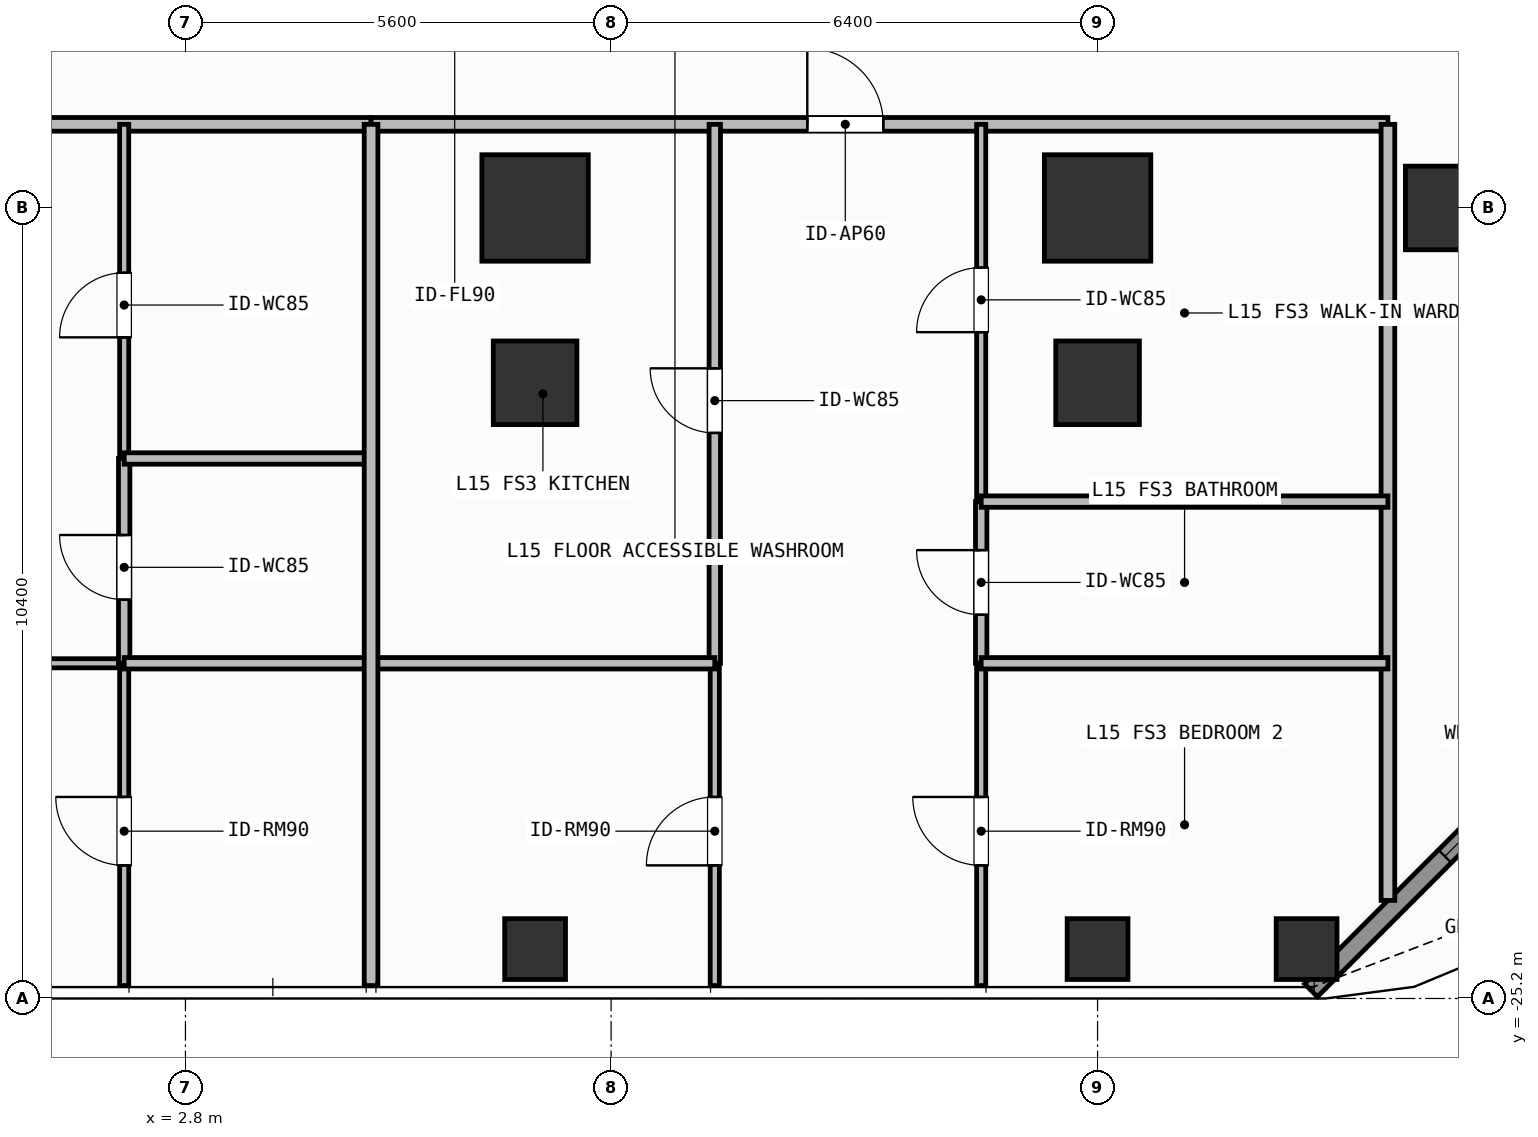
"""IFC4 building model, lengths in metres.
Left out: names, types, materials, properties, quantities, classifications, styles, units other than length and angle.
Written with IfcOpenShell. Run it as: python <this file> out.ifc"""

import sys

from ifc_helpers import new_model, si_unit, direction, frame, frame_2d, origin, origin_2d, place, context, subcontext, project, spatial, rectangle, hollow_rectangle, extrude, element, fill, save


model = new_model("IFC4")
c1 = context("Model", 3, precision=1e-05, world=origin(), true_north=direction((0.0, 1.0)))
c2 = subcontext(c1, "Body", "Model", "MODEL_VIEW")
j1 = project(units=[si_unit("LENGTHUNIT", "METRE"), si_unit("PLANEANGLEUNIT", "RADIAN")], contexts=[c1])
p1 = place(None, origin())
s1 = spatial("IfcSite", under=j1, at=p1, CompositionType="ELEMENT")
p2 = place(p1, origin())
s2 = spatial("IfcBuilding", under=s1, at=p2, CompositionType="ELEMENT")
p3 = place(p2, frame((0.0, 0.0, 57.9)))
s3 = spatial("IfcBuildingStorey", under=s2, at=p3, CompositionType="ELEMENT", Elevation=57.9)
for number, where, z_axis, x_axis in (
    (1, (7.4, -14.8, 0.0), (0.0, 0.0, 1.0), (1.0, 0.0, 0.0)),
    (2, (14.8, -14.8, 0.0), (0.0, 0.0, 1.0), (1.0, 0.0, 0.0)),
):
    element("IfcColumn", number, at=place(p3, frame(where, z_axis=z_axis, x_axis=x_axis)), inside=s3, PredefinedType="COLUMN", context=c2, shape_type="SweptSolid", body=[
        extrude(rectangle(XDim=1.4, YDim=1.4, at=origin_2d()), origin(), (0.0, 0.0, 1.0), 3.9),
    ])
for number, where, z_axis, x_axis in (
    (3, (19.4, -14.8, 0.0), (0.0, 0.0, 1.0), (1.0, 0.0, 0.0)),
    (4, (7.4, -17.1, 0.0), (0.0, 0.0, 1.0), (1.0, 0.0, 0.0)),
    (5, (14.8, -17.1, 0.0), (0.0, 0.0, 1.0), (1.0, 0.0, 0.0)),
):
    element("IfcColumn", number, at=place(p3, frame(where, z_axis=z_axis, x_axis=x_axis)), inside=s3, PredefinedType="COLUMN", context=c2, shape_type="SweptSolid", body=[
        extrude(rectangle(XDim=1.1, YDim=1.1, at=origin_2d()), origin(), (0.0, 0.0, 1.0), 3.9),
    ])
for number, where, z_axis, x_axis in (
    (6, (17.55, -24.55, 0.0), (0.0, 0.0, 1.0), (1.0, 0.0, 0.0)),
    (7, (7.4, -24.55, 0.0), (0.0, 0.0, 1.0), (1.0, 0.0, 0.0)),
    (8, (14.8, -24.55, 0.0), (0.0, 0.0, 1.0), (1.0, 0.0, 0.0)),
):
    element("IfcColumn", number, at=place(p3, frame(where, z_axis=z_axis, x_axis=x_axis)), inside=s3, PredefinedType="COLUMN", context=c2, shape_type="SweptSolid", body=[
        extrude(hollow_rectangle(XDim=0.8, YDim=0.8, WallThickness=0.036, at=origin_2d()), origin(), (0.0, 0.0, 1.0), 3.9),
    ])
p4 = place(p3, frame((22.192, -20.508, 0.0), z_axis=(0.0, 0.0, 1.0), x_axis=(-0.707106781187, -0.707106781187, 0.0)))
e9 = element("IfcWall", 9, at=p4, inside=s3, PredefinedType="SOLIDWALL", context=c2, shape_type="SweptSolid", body=[
    extrude(rectangle(XDim=6.484, YDim=0.24, at=frame_2d((3.242, 0.0))), origin(), (0.0, 0.0, 1.0), 3.68),
])
p5 = place(p4, frame((2.492, 0.0, 0.8)))
e10 = element("IfcOpeningElement", 10, at=p5, cuts=e9, PredefinedType="OPENING", context=c2, shape_type="SweptSolid", body=[
    extrude(rectangle(XDim=1.5, YDim=1.85, at=frame_2d((0.75, 0.925))), frame((0.0, 0.13, 0.0), z_axis=(0.0, -1.0, 0.0), x_axis=(1.0, 0.0, 0.0)), (0.0, 0.0, 1.0), 0.26),
])
p6 = place(p3, frame((-12.225, -13.7, 0.0), z_axis=(0.0, 0.0, 1.0), x_axis=(1.0, 0.0, 0.0)))
e11 = element("IfcWall", 11, at=p6, inside=s3, PredefinedType="PARTITIONING", context=c2, shape_type="SweptSolid", body=[
    extrude(rectangle(XDim=17.467, YDim=0.18, at=frame_2d((8.733, 0.0))), origin(), (0.0, 0.0, 1.0), 3.68),
])
p7 = place(p6, frame((9.848, 0.0, 0.0)))
e12 = element("IfcOpeningElement", 12, at=p7, cuts=e11, PredefinedType="OPENING", context=c2, shape_type="SweptSolid", body=[
    extrude(rectangle(XDim=1.0, YDim=2.2, at=frame_2d((0.5, 1.1))), frame((0.0, 0.1, 0.0), z_axis=(0.0, -1.0, 0.0), x_axis=(1.0, 0.0, 0.0)), (0.0, 0.0, 1.0), 0.2),
])
p8 = place(p3, frame((-5.477, -20.79, 0.0), z_axis=(0.0, 0.0, 1.0), x_axis=(1.0, 0.0, 0.0)))
e13 = element("IfcWall", 13, at=p8, inside=s3, PredefinedType="PARTITIONING", context=c2, shape_type="SweptSolid", body=[
    extrude(rectangle(XDim=7.471, YDim=0.12, at=frame_2d((3.735, 0.0))), origin(), (0.0, 0.0, 1.0), 3.68),
])
p9 = place(p8, frame((3.375, 0.0, 0.0)))
e14 = element("IfcOpeningElement", 14, at=p9, cuts=e13, PredefinedType="OPENING", context=c2, shape_type="SweptSolid", body=[
    extrude(rectangle(XDim=0.9, YDim=2.1, at=frame_2d((0.45, 1.05))), frame((0.0, 0.07, 0.0), z_axis=(0.0, -1.0, 0.0), x_axis=(1.0, 0.0, 0.0)), (0.0, 0.0, 1.0), 0.14),
])
p10 = place(p3, frame((1.994, -20.79, 0.0), z_axis=(0.0, 0.0, 1.0), x_axis=(0.0, 1.0, 0.0)))
e15 = element("IfcWall", 15, at=p10, inside=s3, PredefinedType="PARTITIONING", context=c2, shape_type="SweptSolid", body=[
    extrude(rectangle(XDim=2.694, YDim=0.15, at=frame_2d((1.347, 0.0))), origin(), (0.0, 0.0, 1.0), 3.68),
])
p11 = place(p10, frame((0.837, 0.0, 0.0)))
e16 = element("IfcOpeningElement", 16, at=p11, cuts=e15, PredefinedType="OPENING", context=c2, shape_type="SweptSolid", body=[
    extrude(rectangle(XDim=0.85, YDim=2.1, at=frame_2d((0.425, 1.05))), frame((0.0, 0.085, 0.0), z_axis=(0.0, -1.0, 0.0), x_axis=(1.0, 0.0, 0.0)), (0.0, 0.0, 1.0), 0.17),
])
p12 = place(p3, frame((1.994, -18.096, 0.0), z_axis=(0.0, 0.0, 1.0), x_axis=(0.0, 1.0, 0.0)))
e17 = element("IfcWall", 17, at=p12, inside=s3, PredefinedType="PARTITIONING", context=c2, shape_type="SweptSolid", body=[
    extrude(rectangle(XDim=4.396, YDim=0.12, at=frame_2d((2.198, 0.0))), origin(), (0.0, 0.0, 1.0), 3.68),
])
p13 = place(p12, frame((1.594, 0.0, 0.0)))
e18 = element("IfcOpeningElement", 18, at=p13, cuts=e17, PredefinedType="OPENING", context=c2, shape_type="SweptSolid", body=[
    extrude(rectangle(XDim=0.85, YDim=2.1, at=frame_2d((0.425, 1.05))), frame((0.0, 0.07, 0.0), z_axis=(0.0, -1.0, 0.0), x_axis=(1.0, 0.0, 0.0)), (0.0, 0.0, 1.0), 0.14),
])
p14 = place(p3, frame((1.994, -25.03, 0.0), z_axis=(0.0, 0.0, 1.0), x_axis=(0.0, 1.0, 0.0)))
e19 = element("IfcWall", 19, at=p14, inside=s3, PredefinedType="PARTITIONING", context=c2, shape_type="SweptSolid", body=[
    extrude(rectangle(XDim=4.24, YDim=0.12, at=frame_2d((2.12, 0.0))), origin(), (0.0, 0.0, 1.0), 3.68),
])
p15 = place(p14, frame((1.581, 0.0, 0.0)))
e20 = element("IfcOpeningElement", 20, at=p15, cuts=e19, PredefinedType="OPENING", context=c2, shape_type="SweptSolid", body=[
    extrude(rectangle(XDim=0.9, YDim=2.1, at=frame_2d((0.45, 1.05))), frame((0.0, 0.07, 0.0), z_axis=(0.0, -1.0, 0.0), x_axis=(1.0, 0.0, 0.0)), (0.0, 0.0, 1.0), 0.14),
])
p16 = place(p3, frame((5.242, -13.7, 0.0), z_axis=(0.0, 0.0, 1.0), x_axis=(1.0, 0.0, 0.0)))
e21 = element("IfcWall", 21, at=p16, inside=s3, PredefinedType="PARTITIONING", context=c2, shape_type="SweptSolid", body=[
    extrude(rectangle(XDim=13.378, YDim=0.18, at=frame_2d((6.689, 0.0))), origin(), (0.0, 0.0, 1.0), 3.68),
])
p17 = place(p16, frame((5.739, 0.0, 0.0)))
e22 = element("IfcOpeningElement", 22, at=p17, cuts=e21, PredefinedType="OPENING", context=c2, shape_type="SweptSolid", body=[
    extrude(rectangle(XDim=1.0, YDim=2.2, at=frame_2d((0.5, 1.1))), frame((0.0, 0.1, 0.0), z_axis=(0.0, -1.0, 0.0), x_axis=(1.0, 0.0, 0.0)), (0.0, 0.0, 1.0), 0.2),
])
p18 = place(p3, frame((9.764, -20.79, 0.0), z_axis=(0.0, 0.0, 1.0), x_axis=(0.0, 1.0, 0.0)))
e23 = element("IfcWall", 23, at=p18, inside=s3, PredefinedType="PARTITIONING", context=c2, shape_type="SweptSolid", body=[
    extrude(rectangle(XDim=7.09, YDim=0.15, at=frame_2d((3.545, 0.0))), origin(), (0.0, 0.0, 1.0), 3.68),
])
p19 = place(p18, frame((3.03, 0.0, 0.0)))
e24 = element("IfcOpeningElement", 24, at=p19, cuts=e23, PredefinedType="OPENING", context=c2, shape_type="SweptSolid", body=[
    extrude(rectangle(XDim=0.85, YDim=2.1, at=frame_2d((0.425, 1.05))), frame((0.0, 0.085, 0.0), z_axis=(0.0, -1.0, 0.0), x_axis=(1.0, 0.0, 0.0)), (0.0, 0.0, 1.0), 0.17),
])
p20 = place(p3, frame((9.764, -25.03, 0.0), z_axis=(0.0, 0.0, 1.0), x_axis=(0.0, 1.0, 0.0)))
e25 = element("IfcWall", 25, at=p20, inside=s3, PredefinedType="PARTITIONING", context=c2, shape_type="SweptSolid", body=[
    extrude(rectangle(XDim=4.24, YDim=0.12, at=frame_2d((2.12, 0.0))), origin(), (0.0, 0.0, 1.0), 3.68),
])
p21 = place(p20, frame((1.581, 0.0, 0.0)))
e26 = element("IfcOpeningElement", 26, at=p21, cuts=e25, PredefinedType="OPENING", context=c2, shape_type="SweptSolid", body=[
    extrude(rectangle(XDim=0.9, YDim=2.1, at=frame_2d((0.45, 1.05))), frame((0.0, 0.07, 0.0), z_axis=(0.0, -1.0, 0.0), x_axis=(1.0, 0.0, 0.0)), (0.0, 0.0, 1.0), 0.14),
])
p22 = place(p3, frame((13.269, -20.79, 0.0), z_axis=(0.0, 0.0, 1.0), x_axis=(0.0, 1.0, 0.0)))
e27 = element("IfcWall", 27, at=p22, inside=s3, PredefinedType="PARTITIONING", context=c2, shape_type="SweptSolid", body=[
    extrude(rectangle(XDim=2.127, YDim=0.15, at=frame_2d((1.063, 0.0))), origin(), (0.0, 0.0, 1.0), 3.68),
])
p23 = place(p22, frame((0.638, 0.0, 0.0)))
e28 = element("IfcOpeningElement", 28, at=p23, cuts=e27, PredefinedType="OPENING", context=c2, shape_type="SweptSolid", body=[
    extrude(rectangle(XDim=0.85, YDim=2.1, at=frame_2d((0.425, 1.05))), frame((0.0, 0.085, 0.0), z_axis=(0.0, -1.0, 0.0), x_axis=(1.0, 0.0, 0.0)), (0.0, 0.0, 1.0), 0.17),
])
p24 = place(p3, frame((13.269, -18.663, 0.0), z_axis=(0.0, 0.0, 1.0), x_axis=(0.0, 1.0, 0.0)))
e29 = element("IfcWall", 29, at=p24, inside=s3, PredefinedType="PARTITIONING", context=c2, shape_type="SweptSolid", body=[
    extrude(rectangle(XDim=4.963, YDim=0.12, at=frame_2d((2.481, 0.0))), origin(), (0.0, 0.0, 1.0), 3.68),
])
p25 = place(p24, frame((2.229, 0.0, 0.0)))
e30 = element("IfcOpeningElement", 30, at=p25, cuts=e29, PredefinedType="OPENING", context=c2, shape_type="SweptSolid", body=[
    extrude(rectangle(XDim=0.85, YDim=2.1, at=frame_2d((0.425, 1.05))), frame((0.0, 0.07, 0.0), z_axis=(0.0, -1.0, 0.0), x_axis=(1.0, 0.0, 0.0)), (0.0, 0.0, 1.0), 0.14),
])
p26 = place(p3, frame((13.269, -25.03, 0.0), z_axis=(0.0, 0.0, 1.0), x_axis=(0.0, 1.0, 0.0)))
e31 = element("IfcWall", 31, at=p26, inside=s3, PredefinedType="PARTITIONING", context=c2, shape_type="SweptSolid", body=[
    extrude(rectangle(XDim=4.24, YDim=0.12, at=frame_2d((2.12, 0.0))), origin(), (0.0, 0.0, 1.0), 3.68),
])
p27 = place(p26, frame((1.581, 0.0, 0.0)))
e32 = element("IfcOpeningElement", 32, at=p27, cuts=e31, PredefinedType="OPENING", context=c2, shape_type="SweptSolid", body=[
    extrude(rectangle(XDim=0.9, YDim=2.1, at=frame_2d((0.45, 1.05))), frame((0.0, 0.07, 0.0), z_axis=(0.0, -1.0, 0.0), x_axis=(1.0, 0.0, 0.0)), (0.0, 0.0, 1.0), 0.14),
])
p28 = place(p3, frame((18.62, -23.91, 0.0), z_axis=(0.0, 0.0, 1.0), x_axis=(0.0, 1.0, 0.0)))
e33 = element("IfcWall", 33, at=p28, inside=s3, PredefinedType="PARTITIONING", context=c2, shape_type="SweptSolid", body=[
    extrude(rectangle(XDim=10.21, YDim=0.18, at=frame_2d((5.105, 0.0))), origin(), (0.0, 0.0, 1.0), 3.68),
])
for number, where, z_axis, x_axis in (
    (34, (1.994, -18.096, 0.0), (0.0, 0.0, 1.0), (1.0, 0.0, 0.0)),
    (35, (1.994, -20.79, 0.0), (0.0, 0.0, 1.0), (1.0, 0.0, 0.0)),
):
    element("IfcWall", number, at=place(p3, frame(where, z_axis=z_axis, x_axis=x_axis)), inside=s3, PredefinedType="PARTITIONING", context=c2, shape_type="SweptSolid", body=[
        extrude(rectangle(XDim=3.248, YDim=0.15, at=frame_2d((1.624, 0.0))), origin(), (0.0, 0.0, 1.0), 3.68),
    ])
p29 = place(p3, frame((5.242, -20.79, 0.0), z_axis=(0.0, 0.0, 1.0), x_axis=(1.0, 0.0, 0.0)))
e36 = element("IfcWall", 36, at=p29, inside=s3, PredefinedType="PARTITIONING", context=c2, shape_type="SweptSolid", body=[
    extrude(rectangle(XDim=4.522, YDim=0.15, at=frame_2d((2.261, 0.0))), origin(), (0.0, 0.0, 1.0), 3.68),
])
for number, where, z_axis, x_axis in (
    (37, (13.269, -18.663, 0.0), (0.0, 0.0, 1.0), (1.0, 0.0, 0.0)),
    (38, (13.269, -20.79, 0.0), (0.0, 0.0, 1.0), (1.0, 0.0, 0.0)),
):
    element("IfcWall", number, at=place(p3, frame(where, z_axis=z_axis, x_axis=x_axis)), inside=s3, PredefinedType="PARTITIONING", context=c2, shape_type="SweptSolid", body=[
        extrude(rectangle(XDim=5.351, YDim=0.15, at=frame_2d((2.676, 0.0))), origin(), (0.0, 0.0, 1.0), 3.68),
    ])
p30 = place(p3, frame((5.242, -25.03, 0.0), z_axis=(0.0, 0.0, 1.0), x_axis=(0.0, 1.0, 0.0)))
e39 = element("IfcWall", 39, at=p30, inside=s3, PredefinedType="PARTITIONING", context=c2, shape_type="SweptSolid", body=[
    extrude(rectangle(XDim=11.33, YDim=0.18, at=frame_2d((5.665, 0.0))), origin(), (0.0, 0.0, 1.0), 3.68),
])
p31 = place(p5, origin())
e40 = element("IfcWindow", 40, at=p31, inside=s3, PartitioningType="SINGLE_PANEL", PredefinedType="WINDOW", context=c2, shape_type="SweptSolid", body=[
    extrude(rectangle(XDim=1.5, YDim=1.85, at=frame_2d((0.75, 0.925))), frame((0.0, 0.03, 0.0), z_axis=(0.0, -1.0, 0.0), x_axis=(1.0, 0.0, 0.0)), (0.0, 0.0, 1.0), 0.06),
])
fill(e10, e40)
p32 = place(p11, origin())
e41 = element("IfcDoor", 41, at=p32, inside=s3, OperationType="SINGLE_SWING_RIGHT", PredefinedType="DOOR", context=c2, shape_type="SweptSolid", body=[
    extrude(rectangle(XDim=0.85, YDim=2.1, at=frame_2d((0.425, 1.05))), frame((0.0, 0.025, 0.0), z_axis=(0.0, -1.0, 0.0), x_axis=(1.0, 0.0, 0.0)), (0.0, 0.0, 1.0), 0.05),
])
fill(e16, e41)
p33 = place(p13, origin())
e42 = element("IfcDoor", 42, at=p33, inside=s3, OperationType="SINGLE_SWING_LEFT", PredefinedType="DOOR", context=c2, shape_type="SweptSolid", body=[
    extrude(rectangle(XDim=0.85, YDim=2.1, at=frame_2d((0.425, 1.05))), frame((0.0, 0.025, 0.0), z_axis=(0.0, -1.0, 0.0), x_axis=(1.0, 0.0, 0.0)), (0.0, 0.0, 1.0), 0.05),
])
fill(e18, e42)
p34 = place(p15, origin())
e43 = element("IfcDoor", 43, at=p34, inside=s3, OperationType="SINGLE_SWING_RIGHT", PredefinedType="DOOR", context=c2, shape_type="SweptSolid", body=[
    extrude(rectangle(XDim=0.9, YDim=2.1, at=frame_2d((0.45, 1.05))), frame((0.0, 0.025, 0.0), z_axis=(0.0, -1.0, 0.0), x_axis=(1.0, 0.0, 0.0)), (0.0, 0.0, 1.0), 0.05),
])
fill(e20, e43)
p35 = place(p17, origin())
e44 = element("IfcDoor", 44, at=p35, inside=s3, OperationType="SINGLE_SWING_LEFT", PredefinedType="DOOR", context=c2, shape_type="SweptSolid", body=[
    extrude(rectangle(XDim=1.0, YDim=2.2, at=frame_2d((0.5, 1.1))), frame((0.0, 0.025, 0.0), z_axis=(0.0, -1.0, 0.0), x_axis=(1.0, 0.0, 0.0)), (0.0, 0.0, 1.0), 0.05),
])
fill(e22, e44)
p36 = place(p19, origin())
e45 = element("IfcDoor", 45, at=p36, inside=s3, OperationType="SINGLE_SWING_RIGHT", PredefinedType="DOOR", context=c2, shape_type="SweptSolid", body=[
    extrude(rectangle(XDim=0.85, YDim=2.1, at=frame_2d((0.425, 1.05))), frame((0.0, 0.025, 0.0), z_axis=(0.0, -1.0, 0.0), x_axis=(1.0, 0.0, 0.0)), (0.0, 0.0, 1.0), 0.05),
])
fill(e24, e45)
p37 = place(p21, origin())
e46 = element("IfcDoor", 46, at=p37, inside=s3, OperationType="SINGLE_SWING_LEFT", PredefinedType="DOOR", context=c2, shape_type="SweptSolid", body=[
    extrude(rectangle(XDim=0.9, YDim=2.1, at=frame_2d((0.45, 1.05))), frame((0.0, 0.025, 0.0), z_axis=(0.0, -1.0, 0.0), x_axis=(1.0, 0.0, 0.0)), (0.0, 0.0, 1.0), 0.05),
])
fill(e26, e46)
p38 = place(p23, origin())
e47 = element("IfcDoor", 47, at=p38, inside=s3, OperationType="SINGLE_SWING_RIGHT", PredefinedType="DOOR", context=c2, shape_type="SweptSolid", body=[
    extrude(rectangle(XDim=0.85, YDim=2.1, at=frame_2d((0.425, 1.05))), frame((0.0, 0.025, 0.0), z_axis=(0.0, -1.0, 0.0), x_axis=(1.0, 0.0, 0.0)), (0.0, 0.0, 1.0), 0.05),
])
fill(e28, e47)
p39 = place(p25, origin())
e48 = element("IfcDoor", 48, at=p39, inside=s3, OperationType="SINGLE_SWING_LEFT", PredefinedType="DOOR", context=c2, shape_type="SweptSolid", body=[
    extrude(rectangle(XDim=0.85, YDim=2.1, at=frame_2d((0.425, 1.05))), frame((0.0, 0.025, 0.0), z_axis=(0.0, -1.0, 0.0), x_axis=(1.0, 0.0, 0.0)), (0.0, 0.0, 1.0), 0.05),
])
fill(e30, e48)
p40 = place(p27, origin())
e49 = element("IfcDoor", 49, at=p40, inside=s3, OperationType="SINGLE_SWING_RIGHT", PredefinedType="DOOR", context=c2, shape_type="SweptSolid", body=[
    extrude(rectangle(XDim=0.9, YDim=2.1, at=frame_2d((0.45, 1.05))), frame((0.0, 0.025, 0.0), z_axis=(0.0, -1.0, 0.0), x_axis=(1.0, 0.0, 0.0)), (0.0, 0.0, 1.0), 0.05),
])
fill(e32, e49)
save(model, sys.argv[1])
